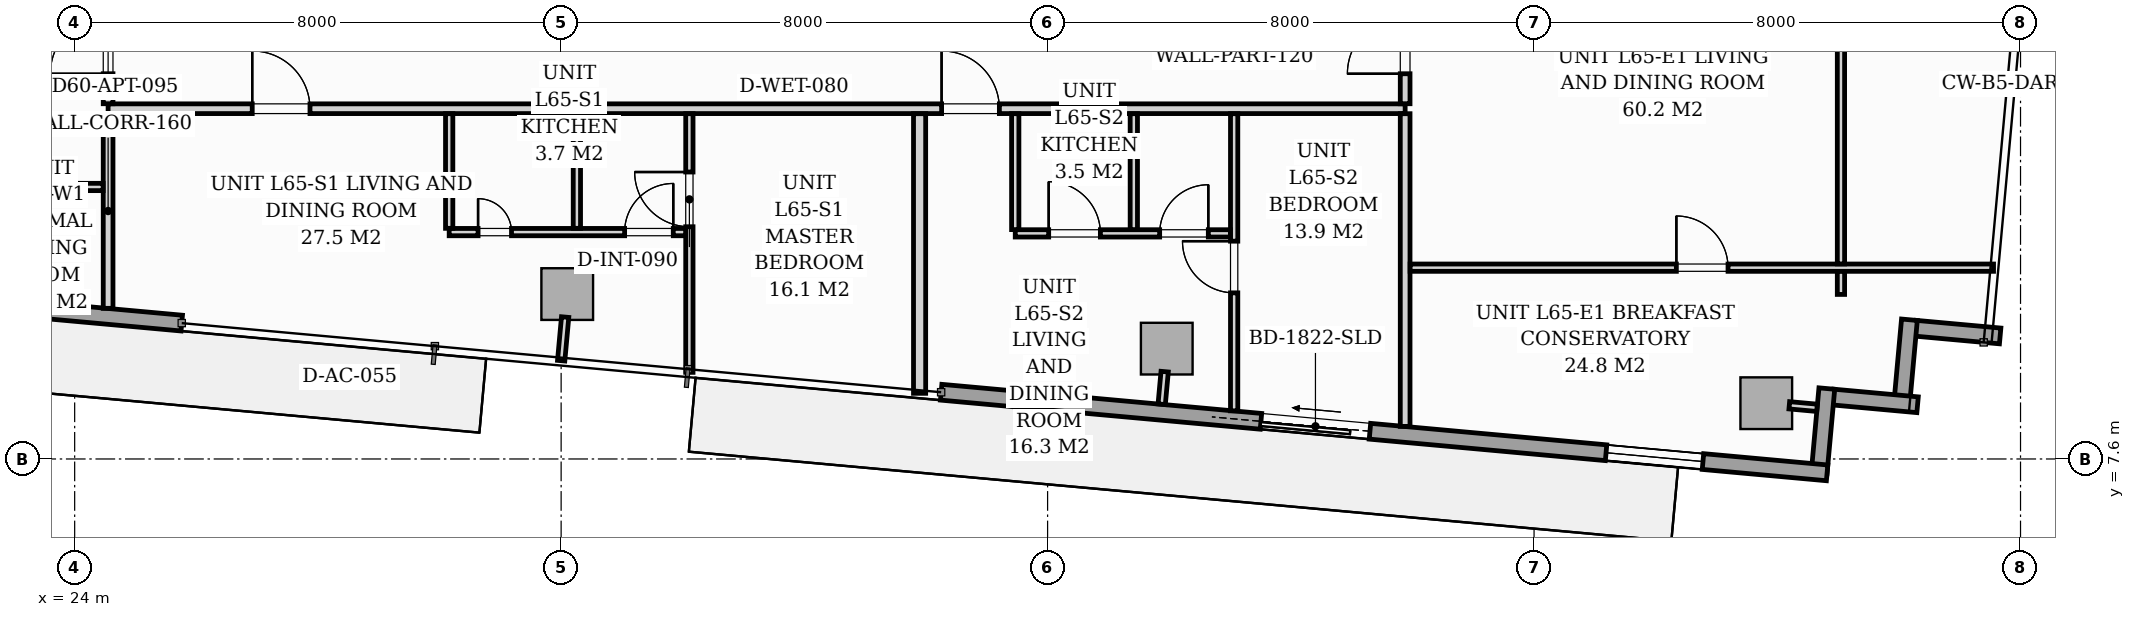
"""IFC4 building model, lengths in metres.
Left out: names, types, materials, properties, quantities, classifications, styles, units other than length and angle.
Written with IfcOpenShell. Run it as: python <this file> out.ifc"""

import sys

from ifc_helpers import new_model, si_unit, direction, frame, frame_2d, origin, origin_2d, place, context, subcontext, project, spatial, rectangle, extrude, source, transform, mapped, element, fill, save


model = new_model("IFC4")
c1 = context("Model", 3, precision=1e-05, world=origin(), true_north=direction((0.0, 1.0)))
c2 = subcontext(c1, "Body", "Model", "MODEL_VIEW")
j1 = project(units=[si_unit("LENGTHUNIT", "METRE"), si_unit("PLANEANGLEUNIT", "RADIAN")], contexts=[c1])
p1 = place(None, origin())
s1 = spatial("IfcSite", under=j1, at=p1, CompositionType="ELEMENT")
p2 = place(p1, origin())
s2 = spatial("IfcBuilding", under=s1, at=p2, CompositionType="ELEMENT")
p3 = place(p2, frame((0.0, 0.0, 226.5)))
s3 = spatial("IfcBuildingStorey", under=s2, at=p3, CompositionType="ELEMENT", Elevation=226.5)
m1 = source(origin(), c2, "Body", "SweptSolid", [
    extrude(rectangle(XDim=0.85, YDim=0.85, at=origin_2d()), origin(), (0.0, 0.0, 1.0), 3.296),
])
for number, where, z_axis, x_axis in (
    (1, (32.1, 10.312, 0.002), (0.0, 0.0, 1.0), (0.996, -0.091, 0.0)),
    (2, (41.96, 9.415, 0.002), (0.0, 0.0, 1.0), (0.996, -0.091, 0.0)),
    (3, (51.819, 8.517, 0.002), (0.0, 0.0, 1.0), (0.996, -0.091, 0.0)),
):
    element("IfcColumn", number, at=place(p3, frame(where, z_axis=z_axis, x_axis=x_axis)), inside=s3, PredefinedType="COLUMN", context=c2, shape_type="MappedRepresentation", body=[
        mapped(m1, transform((0.0, 0.0, 0.0), scale=1.0)),
    ])
for number, where, z_axis, x_axis in (
    (4, (55.665, 9.623, 0.0), (0.0, 0.0, 1.0), (-0.996, 0.091, 0.0)),
    (5, (54.173, 9.889, 0.0), (0.0, 0.0, 1.0), (-0.091, -0.996, 0.0)),
):
    element("IfcWall", number, at=place(p3, frame(where, z_axis=z_axis, x_axis=x_axis)), inside=s3, PredefinedType="STANDARD", context=c2, shape_type="SweptSolid", body=[
        extrude(rectangle(XDim=1.395, YDim=0.26, at=frame_2d((0.698, 0.0))), origin(), (0.0, 0.0, 1.0), 3.04),
    ])
for number, where, z_axis, x_axis in (
    (6, (54.307, 8.492, 0.0), (0.0, 0.0, 1.0), (-0.996, 0.091, 0.0)),
    (7, (52.815, 8.758, 0.0), (0.0, 0.0, 1.0), (-0.091, -0.996, 0.0)),
):
    element("IfcWall", number, at=place(p3, frame(where, z_axis=z_axis, x_axis=x_axis)), inside=s3, PredefinedType="STANDARD", context=c2, shape_type="SweptSolid", body=[
        extrude(rectangle(XDim=1.395, YDim=0.26, at=frame_2d((0.698, 0.0))), origin(), (0.0, 0.0, 1.0), 3.04),
    ])
p4 = place(p3, frame((52.819, 7.372, 0.0), z_axis=(0.0, 0.0, 1.0), x_axis=(-0.995884447498, 0.090632043071, 0.0)))
e8 = element("IfcWall", 8, at=p4, inside=s3, PredefinedType="STANDARD", context=c2, shape_type="SweptSolid", body=[
    extrude(rectangle(XDim=14.63, YDim=0.26, at=frame_2d((7.315, 0.0))), origin(), (0.0, 0.0, 1.0), 3.04),
])
p5 = place(p4, frame((7.549, 0.0, 0.0)))
e9 = element("IfcOpeningElement", 9, at=p5, cuts=e8, PredefinedType="OPENING", context=c2, shape_type="SweptSolid", body=[
    extrude(rectangle(XDim=1.8, YDim=2.06, at=frame_2d((0.9, 1.03))), frame((0.0, 0.14, 0.0), z_axis=(0.0, -1.0, 0.0), x_axis=(1.0, 0.0, 0.0)), (0.0, 0.0, 1.0), 0.28),
])
p6 = place(p4, frame((2.05, 0.0, 0.65)))
e10 = element("IfcOpeningElement", 10, at=p6, cuts=e8, PredefinedType="OPENING", context=c2, shape_type="SweptSolid", body=[
    extrude(rectangle(XDim=1.6, YDim=1.5, at=frame_2d((0.8, 0.75))), frame((0.0, 0.14, 0.0), z_axis=(0.0, -1.0, 0.0), x_axis=(1.0, 0.0, 0.0)), (0.0, 0.0, 1.0), 0.28),
])
p7 = place(p3, frame((25.761, 9.834, 0.0), z_axis=(0.0, 0.0, 1.0), x_axis=(-0.995884584572, 0.090630536861, 0.0)))
e11 = element("IfcWall", 11, at=p7, inside=s3, PredefinedType="STANDARD", context=c2, shape_type="SweptSolid", body=[
    extrude(rectangle(XDim=14.63, YDim=0.26, at=frame_2d((7.315, 0.0))), origin(), (0.0, 0.0, 1.0), 3.04),
])
p8 = place(p7, frame((5.81, 0.0, 0.0)))
e12 = element("IfcOpeningElement", 12, at=p8, cuts=e11, PredefinedType="OPENING", context=c2, shape_type="SweptSolid", body=[
    extrude(rectangle(XDim=1.8, YDim=2.06, at=frame_2d((0.9, 1.03))), frame((0.0, 0.14, 0.0), z_axis=(0.0, -1.0, 0.0), x_axis=(1.0, 0.0, 0.0)), (0.0, 0.0, 1.0), 0.28),
])
p9 = place(p7, frame((8.35, 0.0, 0.65)))
e13 = element("IfcOpeningElement", 13, at=p9, cuts=e11, PredefinedType="OPENING", context=c2, shape_type="SweptSolid", body=[
    extrude(rectangle(XDim=1.6, YDim=1.5, at=frame_2d((0.8, 0.75))), frame((0.0, 0.14, 0.0), z_axis=(0.0, -1.0, 0.0), x_axis=(1.0, 0.0, 0.0)), (0.0, 0.0, 1.0), 0.28),
])
p10 = place(p3, frame((24.55, 13.36, 0.0), z_axis=(0.0, 0.0, 1.0), x_axis=(1.0, 0.0, 0.0)))
e14 = element("IfcWall", 14, at=p10, inside=s3, PredefinedType="PARTITIONING", context=c2, shape_type="SweptSolid", body=[
    extrude(rectangle(XDim=21.33, YDim=0.16, at=frame_2d((10.665, 0.0))), origin(), (0.0, 0.0, 1.0), 2.605),
])
p11 = place(p10, frame((2.37, 0.0, 0.0)))
e15 = element("IfcOpeningElement", 15, at=p11, cuts=e14, PredefinedType="OPENING", context=c2, shape_type="SweptSolid", body=[
    extrude(rectangle(XDim=0.95, YDim=2.06, at=frame_2d((0.475, 1.03))), frame((0.0, 0.09, 0.0), z_axis=(0.0, -1.0, 0.0), x_axis=(1.0, 0.0, 0.0)), (0.0, 0.0, 1.0), 0.18),
])
p12 = place(p10, frame((13.707, 0.0, 0.0)))
e16 = element("IfcOpeningElement", 16, at=p12, cuts=e14, PredefinedType="OPENING", context=c2, shape_type="SweptSolid", body=[
    extrude(rectangle(XDim=0.95, YDim=2.06, at=frame_2d((0.475, 1.03))), frame((0.0, 0.09, 0.0), z_axis=(0.0, -1.0, 0.0), x_axis=(1.0, 0.0, 0.0)), (0.0, 0.0, 1.0), 0.18),
])
p13 = place(p3, frame((24.55, 10.077, 0.0), z_axis=(0.0, 0.0, 1.0), x_axis=(0.0, 1.0, 0.0)))
e17 = element("IfcWall", 17, at=p13, inside=s3, PredefinedType="PARTITIONING", context=c2, shape_type="SweptSolid", body=[
    extrude(rectangle(XDim=3.201, YDim=0.16, at=frame_2d((1.601, 0.0))), origin(), (0.0, 0.0, 1.0), 3.04),
])
p14 = place(p3, frame((24.55, 13.442, 0.0), z_axis=(0.0, 0.0, 1.0), x_axis=(0.0, 1.0, 0.0)))
e18 = element("IfcWall", 18, at=p14, inside=s3, PredefinedType="PARTITIONING", context=c2, shape_type="SweptSolid", body=[
    extrude(rectangle(XDim=7.208, YDim=0.16, at=frame_2d((3.604, 0.0))), origin(), (0.0, 0.0, 1.0), 3.04),
])
p15 = place(p14, frame((0.493, 0.0, 0.0)))
e19 = element("IfcOpeningElement", 19, at=p15, cuts=e18, PredefinedType="OPENING", context=c2, shape_type="SweptSolid", body=[
    extrude(rectangle(XDim=0.95, YDim=2.06, at=frame_2d((0.475, 1.03))), frame((0.0, 0.09, 0.0), z_axis=(0.0, -1.0, 0.0), x_axis=(1.0, 0.0, 0.0)), (0.0, 0.0, 1.0), 0.18),
])
p16 = place(p14, frame((4.721, 0.0, 0.0)))
e20 = element("IfcOpeningElement", 20, at=p16, cuts=e18, PredefinedType="OPENING", context=c2, shape_type="SweptSolid", body=[
    extrude(rectangle(XDim=0.95, YDim=2.06, at=frame_2d((0.475, 1.03))), frame((0.0, 0.09, 0.0), z_axis=(0.0, -1.0, 0.0), x_axis=(1.0, 0.0, 0.0)), (0.0, 0.0, 1.0), 0.18),
])
p17 = place(p3, frame((45.88, 8.136, 0.0), z_axis=(0.0, 0.0, 1.0), x_axis=(0.0, 1.0, 0.0)))
e21 = element("IfcWall", 21, at=p17, inside=s3, PredefinedType="PARTITIONING", context=c2, shape_type="SweptSolid", body=[
    extrude(rectangle(XDim=5.142, YDim=0.16, at=frame_2d((2.571, 0.0))), origin(), (0.0, 0.0, 1.0), 3.04),
])
p18 = place(p3, frame((45.88, 13.442, 0.0), z_axis=(0.0, 0.0, 1.0), x_axis=(0.0, 1.0, 0.0)))
e22 = element("IfcWall", 22, at=p18, inside=s3, PredefinedType="PARTITIONING", context=c2, shape_type="SweptSolid", body=[
    extrude(rectangle(XDim=4.36, YDim=0.16, at=frame_2d((2.18, 0.0))), origin(), (0.0, 0.0, 1.0), 3.04),
])
p19 = place(p18, frame((0.493, 0.0, 0.0)))
e23 = element("IfcOpeningElement", 23, at=p19, cuts=e22, PredefinedType="OPENING", context=c2, shape_type="SweptSolid", body=[
    extrude(rectangle(XDim=0.95, YDim=2.06, at=frame_2d((0.475, 1.03))), frame((0.0, 0.09, 0.0), z_axis=(0.0, -1.0, 0.0), x_axis=(1.0, 0.0, 0.0)), (0.0, 0.0, 1.0), 0.18),
])
p20 = place(p3, frame((34.109, 9.024, 0.0), z_axis=(0.0, 0.0, 1.0), x_axis=(0.0, 1.0, 0.0)))
e24 = element("IfcWall", 24, at=p20, inside=s3, PredefinedType="PARTITIONING", context=c2, shape_type="SweptSolid", body=[
    extrude(rectangle(XDim=4.254, YDim=0.12, at=frame_2d((2.127, 0.0))), origin(), (0.0, 0.0, 1.0), 3.04),
])
p21 = place(p20, frame((2.395, 0.0, 0.0)))
e25 = element("IfcOpeningElement", 25, at=p21, cuts=e24, PredefinedType="OPENING", context=c2, shape_type="SweptSolid", body=[
    extrude(rectangle(XDim=0.9, YDim=2.05, at=frame_2d((0.45, 1.025))), frame((0.0, 0.07, 0.0), z_axis=(0.0, -1.0, 0.0), x_axis=(1.0, 0.0, 0.0)), (0.0, 0.0, 1.0), 0.14),
])
p22 = place(p3, frame((30.159, 11.331, 0.0), z_axis=(0.0, 0.0, 1.0), x_axis=(1.0, 0.0, 0.0)))
e26 = element("IfcWall", 26, at=p22, inside=s3, PredefinedType="PARTITIONING", context=c2, shape_type="SweptSolid", body=[
    extrude(rectangle(XDim=3.888, YDim=0.12, at=frame_2d((1.944, 0.0))), origin(), (0.0, 0.0, 1.0), 2.605),
])
p23 = place(p22, frame((0.475, 0.0, 0.0)))
e27 = element("IfcOpeningElement", 27, at=p23, cuts=e26, PredefinedType="OPENING", context=c2, shape_type="SweptSolid", body=[
    extrude(rectangle(XDim=0.55, YDim=2.0, at=frame_2d((0.275, 1.0))), frame((0.0, 0.07, 0.0), z_axis=(0.0, -1.0, 0.0), x_axis=(1.0, 0.0, 0.0)), (0.0, 0.0, 1.0), 0.14),
])
p24 = place(p22, frame((2.885, 0.0, 0.0)))
e28 = element("IfcOpeningElement", 28, at=p24, cuts=e26, PredefinedType="OPENING", context=c2, shape_type="SweptSolid", body=[
    extrude(rectangle(XDim=0.8, YDim=2.02, at=frame_2d((0.4, 1.01))), frame((0.0, 0.07, 0.0), z_axis=(0.0, -1.0, 0.0), x_axis=(1.0, 0.0, 0.0)), (0.0, 0.0, 1.0), 0.14),
])
p25 = place(p3, frame((32.259, 11.393, 0.0), z_axis=(0.0, 0.0, 1.0), x_axis=(0.0, 1.0, 0.0)))
e29 = element("IfcWall", 29, at=p25, inside=s3, PredefinedType="PARTITIONING", context=c2, shape_type="SweptSolid", body=[
    extrude(rectangle(XDim=1.885, YDim=0.12, at=frame_2d((0.942, 0.0))), origin(), (0.0, 0.0, 1.0), 2.4),
])
p26 = place(p3, frame((30.159, 11.393, 0.0), z_axis=(0.0, 0.0, 1.0), x_axis=(0.0, 1.0, 0.0)))
e30 = element("IfcWall", 30, at=p26, inside=s3, PredefinedType="PARTITIONING", context=c2, shape_type="SweptSolid", body=[
    extrude(rectangle(XDim=1.885, YDim=0.12, at=frame_2d((0.942, 0.0))), origin(), (0.0, 0.0, 1.0), 3.04),
])
p27 = place(p3, frame((37.895, 8.68, 0.0), z_axis=(0.0, 0.0, 1.0), x_axis=(0.0, 1.0, 0.0)))
e31 = element("IfcWall", 31, at=p27, inside=s3, PredefinedType="PARTITIONING", context=c2, shape_type="SweptSolid", body=[
    extrude(rectangle(XDim=4.598, YDim=0.2, at=frame_2d((2.299, 0.0))), origin(), (0.0, 0.0, 1.0), 3.04),
])
p28 = place(p3, frame((43.068, 8.392, 0.0), z_axis=(0.0, 0.0, 1.0), x_axis=(0.0, 1.0, 0.0)))
e32 = element("IfcWall", 32, at=p28, inside=s3, PredefinedType="PARTITIONING", context=c2, shape_type="SweptSolid", body=[
    extrude(rectangle(XDim=4.886, YDim=0.12, at=frame_2d((2.443, 0.0))), origin(), (0.0, 0.0, 1.0), 3.04),
])
p29 = place(p28, frame((1.94, 0.0, 0.0)))
e33 = element("IfcOpeningElement", 33, at=p29, cuts=e32, PredefinedType="OPENING", context=c2, shape_type="SweptSolid", body=[
    extrude(rectangle(XDim=0.85, YDim=2.05, at=frame_2d((0.425, 1.025))), frame((0.0, 0.07, 0.0), z_axis=(0.0, -1.0, 0.0), x_axis=(1.0, 0.0, 0.0)), (0.0, 0.0, 1.0), 0.14),
])
p30 = place(p3, frame((39.468, 11.31, 0.0), z_axis=(0.0, 0.0, 1.0), x_axis=(1.0, 0.0, 0.0)))
e34 = element("IfcWall", 34, at=p30, inside=s3, PredefinedType="PARTITIONING", context=c2, shape_type="SweptSolid", body=[
    extrude(rectangle(XDim=3.538, YDim=0.12, at=frame_2d((1.769, 0.0))), origin(), (0.0, 0.0, 1.0), 3.04),
])
p31 = place(p30, frame((0.55, 0.0, 0.0)))
e35 = element("IfcOpeningElement", 35, at=p31, cuts=e34, PredefinedType="OPENING", context=c2, shape_type="SweptSolid", body=[
    extrude(rectangle(XDim=0.85, YDim=2.05, at=frame_2d((0.425, 1.025))), frame((0.0, 0.07, 0.0), z_axis=(0.0, -1.0, 0.0), x_axis=(1.0, 0.0, 0.0)), (0.0, 0.0, 1.0), 0.14),
])
p32 = place(p30, frame((2.375, 0.0, 0.0)))
e36 = element("IfcOpeningElement", 36, at=p32, cuts=e34, PredefinedType="OPENING", context=c2, shape_type="SweptSolid", body=[
    extrude(rectangle(XDim=0.8, YDim=2.02, at=frame_2d((0.4, 1.01))), frame((0.0, 0.07, 0.0), z_axis=(0.0, -1.0, 0.0), x_axis=(1.0, 0.0, 0.0)), (0.0, 0.0, 1.0), 0.14),
])
for number, where, z_axis, x_axis in (
    (37, (39.468, 11.372, 0.0), (0.0, 0.0, 1.0), (0.0, 1.0, 0.0)),
    (38, (41.418, 11.372, 0.0), (0.0, 0.0, 1.0), (0.0, 1.0, 0.0)),
):
    element("IfcWall", number, at=place(p3, frame(where, z_axis=z_axis, x_axis=x_axis)), inside=s3, PredefinedType="PARTITIONING", context=c2, shape_type="SweptSolid", body=[
        extrude(rectangle(XDim=1.906, YDim=0.12, at=frame_2d((0.953, 0.0))), origin(), (0.0, 0.0, 1.0), 3.04),
    ])
p33 = place(p3, frame((13.643, 12.073, 0.0), z_axis=(0.0, 0.0, 1.0), x_axis=(1.0, 0.0, 0.0)))
e39 = element("IfcWall", 39, at=p33, inside=s3, PredefinedType="PARTITIONING", context=c2, shape_type="SweptSolid", body=[
    extrude(rectangle(XDim=10.825, YDim=0.12, at=frame_2d((5.413, 0.0))), origin(), (0.0, 0.0, 1.0), 2.482),
])
p34 = place(p33, frame((4.988, 0.0, 0.0)))
e40 = element("IfcOpeningElement", 40, at=p34, cuts=e39, PredefinedType="OPENING", context=c2, shape_type="SweptSolid", body=[
    extrude(rectangle(XDim=0.85, YDim=2.05, at=frame_2d((0.425, 1.025))), frame((0.0, 0.07, 0.0), z_axis=(0.0, -1.0, 0.0), x_axis=(1.0, 0.0, 0.0)), (0.0, 0.0, 1.0), 0.14),
])
p35 = place(p3, frame((45.962, 10.746, 0.0), z_axis=(0.0, 0.0, 1.0), x_axis=(1.0, 0.0, 0.0)))
e41 = element("IfcWall", 41, at=p35, inside=s3, PredefinedType="PARTITIONING", context=c2, shape_type="SweptSolid", body=[
    extrude(rectangle(XDim=9.594, YDim=0.12, at=frame_2d((4.797, 0.0))), origin(), (0.0, 0.0, 1.0), 3.04),
])
p36 = place(p35, frame((4.378, 0.0, 0.0)))
e42 = element("IfcOpeningElement", 42, at=p36, cuts=e41, PredefinedType="OPENING", context=c2, shape_type="SweptSolid", body=[
    extrude(rectangle(XDim=0.85, YDim=2.05, at=frame_2d((0.425, 1.025))), frame((0.0, 0.07, 0.0), z_axis=(0.0, -1.0, 0.0), x_axis=(1.0, 0.0, 0.0)), (0.0, 0.0, 1.0), 0.14),
])
p37 = place(p3, frame((53.047, 10.306, 0.0), z_axis=(0.0, 0.0, 1.0), x_axis=(0.0, 1.0, 0.0)))
e43 = element("IfcWall", 43, at=p37, inside=s3, PredefinedType="PARTITIONING", context=c2, shape_type="SweptSolid", body=[
    extrude(rectangle(XDim=0.378, YDim=0.12, at=frame_2d((0.189, 0.0))), origin(), (0.0, 0.0, 1.0), 3.04),
])
p38 = place(p3, frame((53.047, 10.808, 0.0), z_axis=(0.0, 0.0, 1.0), x_axis=(0.0, 1.0, 0.0)))
e44 = element("IfcWall", 44, at=p38, inside=s3, PredefinedType="PARTITIONING", context=c2, shape_type="SweptSolid", body=[
    extrude(rectangle(XDim=10.084, YDim=0.12, at=frame_2d((5.042, 0.0))), origin(), (0.0, 0.0, 1.0), 3.04),
])
p39 = place(p38, frame((3.54, 0.0, 0.0)))
e45 = element("IfcOpeningElement", 45, at=p39, cuts=e44, PredefinedType="OPENING", context=c2, shape_type="SweptSolid", body=[
    extrude(rectangle(XDim=0.85, YDim=2.05, at=frame_2d((0.425, 1.025))), frame((0.0, 0.07, 0.0), z_axis=(0.0, -1.0, 0.0), x_axis=(1.0, 0.0, 0.0)), (0.0, 0.0, 1.0), 0.14),
])
p40 = place(p3, frame((32.066, 9.933, 0.0), z_axis=(0.0, 0.0, 1.0), x_axis=(-0.090872036342, -0.995862577373, 0.0)))
e46 = element("IfcWall", 46, at=p40, inside=s3, PredefinedType="PARTITIONING", context=c2, shape_type="SweptSolid", body=[
    extrude(rectangle(XDim=0.72, YDim=0.12, at=frame_2d((0.36, 0.0))), origin(), (0.0, 0.0, 1.0), 3.04),
])
p41 = place(p3, frame((41.925, 9.036, 0.0), z_axis=(0.0, 0.0, 1.0), x_axis=(-0.090740281653, -0.995874591144, 0.0)))
e47 = element("IfcWall", 47, at=p41, inside=s3, PredefinedType="PARTITIONING", context=c2, shape_type="SweptSolid", body=[
    extrude(rectangle(XDim=0.538, YDim=0.12, at=frame_2d((0.269, 0.0))), origin(), (0.0, 0.0, 1.0), 3.04),
])
p42 = place(p3, frame((52.197, 8.483, 0.0), z_axis=(0.0, 0.0, 1.0), x_axis=(0.995884462012, -0.090631883588, 0.0)))
e48 = element("IfcWall", 48, at=p42, inside=s3, PredefinedType="PARTITIONING", context=c2, shape_type="SweptSolid", body=[
    extrude(rectangle(XDim=0.458, YDim=0.12, at=frame_2d((0.229, 0.0))), origin(), (0.0, 0.0, 1.0), 3.04),
])
m2 = source(origin(), c2, "Body", "SweptSolid", [
    extrude(rectangle(XDim=1.8, YDim=2.06, at=frame_2d((0.9, 1.03))), frame((0.0, 0.025, 0.0), z_axis=(0.0, -1.0, 0.0), x_axis=(1.0, 0.0, 0.0)), (0.0, 0.0, 1.0), 0.05),
])
p43 = place(p5, origin())
e49 = element("IfcDoor", 49, at=p43, inside=s3, OperationType="SLIDING_TO_RIGHT", PredefinedType="DOOR", context=c2, shape_type="MappedRepresentation", body=[
    mapped(m2, transform((0.0, 0.0, 0.0), scale=1.0)),
])
fill(e9, e49)
m3 = source(origin(), c2, "Body", "SweptSolid", [
    extrude(rectangle(XDim=1.6, YDim=1.5, at=frame_2d((0.8, 0.75))), frame((0.0, 0.03, 0.0), z_axis=(0.0, -1.0, 0.0), x_axis=(1.0, 0.0, 0.0)), (0.0, 0.0, 1.0), 0.06),
])
p44 = place(p6, origin())
e50 = element("IfcWindow", 50, at=p44, inside=s3, PartitioningType="SINGLE_PANEL", PredefinedType="WINDOW", context=c2, shape_type="MappedRepresentation", body=[
    mapped(m3, transform((0.0, 0.0, 0.0), scale=1.0)),
])
fill(e10, e50)
m4 = source(origin(), c2, "Body", "SweptSolid", [
    extrude(rectangle(XDim=0.95, YDim=2.06, at=frame_2d((0.475, 1.03))), frame((0.0, 0.025, 0.0), z_axis=(0.0, -1.0, 0.0), x_axis=(1.0, 0.0, 0.0)), (0.0, 0.0, 1.0), 0.05),
])
p45 = place(p11, origin())
e51 = element("IfcDoor", 51, at=p45, inside=s3, OperationType="SINGLE_SWING_LEFT", PredefinedType="DOOR", context=c2, shape_type="MappedRepresentation", body=[
    mapped(m4, transform((0.0, 0.0, 0.0), scale=1.0)),
])
fill(e15, e51)
m5 = source(origin(), c2, "Body", "SweptSolid", [
    extrude(rectangle(XDim=0.9, YDim=2.05, at=frame_2d((0.45, 1.025))), frame((0.0, 0.025, 0.0), z_axis=(0.0, -1.0, 0.0), x_axis=(1.0, 0.0, 0.0)), (0.0, 0.0, 1.0), 0.05),
])
p46 = place(p21, origin())
e52 = element("IfcDoor", 52, at=p46, inside=s3, OperationType="SINGLE_SWING_RIGHT", PredefinedType="DOOR", context=c2, shape_type="MappedRepresentation", body=[
    mapped(m5, transform((0.0, 0.0, 0.0), scale=1.0)),
])
fill(e25, e52)
m6 = source(origin(), c2, "Body", "SweptSolid", [
    extrude(rectangle(XDim=0.55, YDim=2.0, at=frame_2d((0.275, 1.0))), frame((0.0, 0.025, 0.0), z_axis=(0.0, -1.0, 0.0), x_axis=(1.0, 0.0, 0.0)), (0.0, 0.0, 1.0), 0.05),
])
p47 = place(p23, origin())
e53 = element("IfcDoor", 53, at=p47, inside=s3, OperationType="SINGLE_SWING_LEFT", PredefinedType="DOOR", context=c2, shape_type="MappedRepresentation", body=[
    mapped(m6, transform((0.0, 0.0, 0.0), scale=1.0)),
])
fill(e27, e53)
m7 = source(origin(), c2, "Body", "SweptSolid", [
    extrude(rectangle(XDim=0.8, YDim=2.02, at=frame_2d((0.4, 1.01))), frame((0.0, 0.025, 0.0), z_axis=(0.0, -1.0, 0.0), x_axis=(1.0, 0.0, 0.0)), (0.0, 0.0, 1.0), 0.05),
])
p48 = place(p24, origin())
e54 = element("IfcDoor", 54, at=p48, inside=s3, OperationType="SINGLE_SWING_RIGHT", PredefinedType="DOOR", context=c2, shape_type="MappedRepresentation", body=[
    mapped(m7, transform((0.0, 0.0, 0.0), scale=1.0)),
])
fill(e28, e54)
p49 = place(p12, origin())
e55 = element("IfcDoor", 55, at=p49, inside=s3, OperationType="SINGLE_SWING_LEFT", PredefinedType="DOOR", context=c2, shape_type="MappedRepresentation", body=[
    mapped(m4, transform((0.0, 0.0, 0.0), scale=1.0)),
])
fill(e16, e55)
m8 = source(origin(), c2, "Body", "SweptSolid", [
    extrude(rectangle(XDim=0.85, YDim=2.05, at=frame_2d((0.425, 1.025))), frame((0.0, 0.025, 0.0), z_axis=(0.0, -1.0, 0.0), x_axis=(1.0, 0.0, 0.0)), (0.0, 0.0, 1.0), 0.05),
])
p50 = place(p29, origin())
e56 = element("IfcDoor", 56, at=p50, inside=s3, OperationType="SINGLE_SWING_RIGHT", PredefinedType="DOOR", context=c2, shape_type="MappedRepresentation", body=[
    mapped(m8, transform((0.0, 0.0, 0.0), scale=1.0)),
])
fill(e33, e56)
p51 = place(p31, origin())
e57 = element("IfcDoor", 57, at=p51, inside=s3, OperationType="SINGLE_SWING_LEFT", PredefinedType="DOOR", context=c2, shape_type="MappedRepresentation", body=[
    mapped(m8, transform((0.0, 0.0, 0.0), scale=1.0)),
])
fill(e35, e57)
p52 = place(p32, origin())
e58 = element("IfcDoor", 58, at=p52, inside=s3, OperationType="SINGLE_SWING_RIGHT", PredefinedType="DOOR", context=c2, shape_type="MappedRepresentation", body=[
    mapped(m7, transform((0.0, 0.0, 0.0), scale=1.0)),
])
fill(e36, e58)
p53 = place(p15, origin())
e59 = element("IfcDoor", 59, at=p53, inside=s3, OperationType="SINGLE_SWING_LEFT", PredefinedType="DOOR", context=c2, shape_type="MappedRepresentation", body=[
    mapped(m4, transform((0.0, 0.0, 0.0), scale=1.0)),
])
fill(e19, e59)
p54 = place(p19, origin())
e60 = element("IfcDoor", 60, at=p54, inside=s3, OperationType="SINGLE_SWING_LEFT", PredefinedType="DOOR", context=c2, shape_type="MappedRepresentation", body=[
    mapped(m4, transform((0.0, 0.0, 0.0), scale=1.0)),
])
fill(e23, e60)
p55 = place(p36, origin())
e61 = element("IfcDoor", 61, at=p55, inside=s3, OperationType="SINGLE_SWING_LEFT", PredefinedType="DOOR", context=c2, shape_type="MappedRepresentation", body=[
    mapped(m8, transform((0.0, 0.0, 0.0), scale=1.0)),
])
fill(e42, e61)
save(model, sys.argv[1])
